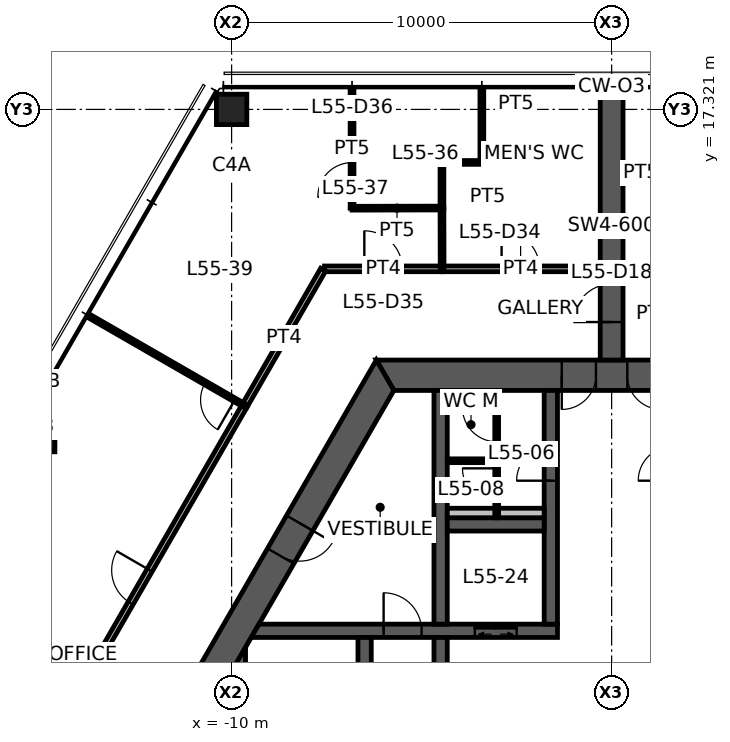
"""IFC4 building model, lengths in metres.
Left out: names, types, materials, properties, quantities, classifications, styles, units other than length and angle.
Written with IfcOpenShell. Run it as: python <this file> out.ifc"""

import sys

from ifc_helpers import new_model, si_unit, direction, frame, frame_2d, origin, origin_2d, place, context, subcontext, project, spatial, polyline, rectangle, hollow_rectangle, outline, extrude, element, fill, save


model = new_model("IFC4")
c1 = context("Model", 3, precision=1e-05, world=origin(), true_north=direction((0.0, 1.0)))
c2 = subcontext(c1, "Body", "Model", "MODEL_VIEW")
j1 = project(units=[si_unit("LENGTHUNIT", "METRE"), si_unit("PLANEANGLEUNIT", "RADIAN")], contexts=[c1])
p1 = place(None, origin())
s1 = spatial("IfcSite", under=j1, at=p1, CompositionType="ELEMENT")
p2 = place(p1, origin())
s2 = spatial("IfcBuilding", under=s1, at=p2, CompositionType="ELEMENT")
p3 = place(p2, frame((0.0, 0.0, 220.6)))
s3 = spatial("IfcBuildingStorey", under=s2, at=p3, CompositionType="ELEMENT", Elevation=220.6)
p4 = place(p3, frame((-10.0, 17.321, 0.0), z_axis=(0.0, 0.0, 1.0), x_axis=(1.0, 0.0, 0.0)))
e1 = element("IfcColumn", 1, at=p4, inside=s3, PredefinedType="COLUMN", context=c2, shape_type="SweptSolid", body=[
    extrude(hollow_rectangle(XDim=0.8, YDim=0.8, WallThickness=0.04, at=origin_2d()), origin(), (0.0, 0.0, 1.0), 3.9),
])
p5 = place(p3, frame((-15.0, 8.66, 0.0), z_axis=(0.0, 0.0, 1.0), x_axis=(1.0, 0.0, 0.0)))
e2 = element("IfcColumn", 2, at=p5, inside=s3, PredefinedType="COLUMN", context=c2, shape_type="SweptSolid", body=[
    extrude(hollow_rectangle(XDim=0.7, YDim=0.7, WallThickness=0.032, at=origin_2d()), origin(), (0.0, 0.0, 1.0), 3.9),
])
p6 = place(p3, frame((5.961, 10.325, 0.0), z_axis=(0.0, 0.0, 1.0), x_axis=(-1.0, 0.0, 0.0)))
e3 = element("IfcWall", 3, at=p6, inside=s3, PredefinedType="SHEAR", context=c2, shape_type="SweptSolid", body=[
    extrude(outline(polyline([(-0.231, -0.4), (4.649, -0.4), (5.549, -0.4), (6.374, -0.4), (7.273, -0.4), (12.153, -0.4), (11.691, 0.4), (7.273, 0.4), (6.374, 0.4), (5.549, 0.4), (4.649, 0.4), (0.231, 0.4), (-0.231, -0.4)])), origin(), (0.0, 0.0, 1.0), 3.9),
])
p7 = place(p6, frame((6.374, 0.0, 0.0)))
e4 = element("IfcOpeningElement", 4, at=p7, cuts=e3, PredefinedType="OPENING", context=c2, shape_type="SweptSolid", body=[
    extrude(rectangle(XDim=0.9, YDim=2.1, at=frame_2d((0.45, 1.05))), frame((0.0, 0.41, 0.0), z_axis=(0.0, -1.0, 0.0), x_axis=(1.0, 0.0, 0.0)), (0.0, 0.0, 1.0), 0.82),
])
p8 = place(p6, frame((4.649, 0.0, 0.0)))
e5 = element("IfcOpeningElement", 5, at=p8, cuts=e3, PredefinedType="OPENING", context=c2, shape_type="SweptSolid", body=[
    extrude(rectangle(XDim=0.9, YDim=2.1, at=frame_2d((0.45, 1.05))), frame((0.0, 0.41, 0.0), z_axis=(0.0, -1.0, 0.0), x_axis=(1.0, 0.0, 0.0)), (0.0, 0.0, 1.0), 0.82),
])
p9 = place(p3, frame((-5.961, 10.325, 0.0), z_axis=(0.0, 0.0, 1.0), x_axis=(-0.500004296715, -0.866022923061, 0.0)))
e6 = element("IfcWall", 6, at=p9, inside=s3, PredefinedType="SHEAR", context=c2, shape_type="SweptSolid", body=[
    extrude(outline(polyline([(-0.231, -0.4), (4.494, -0.4), (5.494, -0.4), (12.153, -0.4), (11.691, 0.4), (5.494, 0.4), (4.494, 0.4), (0.231, 0.4), (-0.231, -0.4)])), origin(), (0.0, 0.0, 1.0), 3.9),
])
p10 = place(p9, frame((4.494, 0.0, 0.0)))
e7 = element("IfcOpeningElement", 7, at=p10, cuts=e6, PredefinedType="OPENING", context=c2, shape_type="SweptSolid", body=[
    extrude(rectangle(XDim=1.0, YDim=2.1, at=frame_2d((0.5, 1.05))), frame((0.0, 0.41, 0.0), z_axis=(0.0, -1.0, 0.0), x_axis=(1.0, 0.0, 0.0)), (0.0, 0.0, 1.0), 0.82),
])
p11 = place(p3, frame((0.0, 10.725, 0.0), z_axis=(0.0, 0.0, 1.0), x_axis=(0.0, 1.0, 0.0)))
e8 = element("IfcWall", 8, at=p11, inside=s3, PredefinedType="SHEAR", context=c2, shape_type="SweptSolid", body=[
    extrude(rectangle(XDim=7.045, YDim=0.6, at=frame_2d((3.523, 0.0))), origin(), (0.0, 0.0, 1.0), 3.9),
])
p12 = place(p11, frame((1.0, 0.0, 0.0)))
e9 = element("IfcOpeningElement", 9, at=p12, cuts=e8, PredefinedType="OPENING", context=c2, shape_type="SweptSolid", body=[
    extrude(rectangle(XDim=1.0, YDim=2.1, at=frame_2d((0.5, 1.05))), frame((0.0, 0.31, 0.0), z_axis=(0.0, -1.0, 0.0), x_axis=(1.0, 0.0, 0.0)), (0.0, 0.0, 1.0), 0.62),
])
p13 = place(p3, frame((-9.382, 3.6, 0.0), z_axis=(0.0, 0.0, 1.0), x_axis=(1.0, 0.0, 0.0)))
e10 = element("IfcWall", 10, at=p13, inside=s3, PredefinedType="SHEAR", context=c2, shape_type="SweptSolid", body=[
    extrude(outline(polyline([(-0.101, -0.175), (3.382, -0.175), (4.382, -0.175), (5.782, -0.175), (6.882, -0.175), (7.957, -0.175), (7.957, 0.175), (6.882, 0.175), (5.782, 0.175), (4.382, 0.175), (3.382, 0.175), (0.101, 0.175), (-0.101, -0.175)])), origin(), (0.0, 0.0, 1.0), 3.9),
])
p14 = place(p13, frame((3.382, 0.0, 0.0)))
e11 = element("IfcOpeningElement", 11, at=p14, cuts=e10, PredefinedType="OPENING", context=c2, shape_type="SweptSolid", body=[
    extrude(rectangle(XDim=1.0, YDim=2.1, at=frame_2d((0.5, 1.05))), frame((0.0, 0.185, 0.0), z_axis=(0.0, -1.0, 0.0), x_axis=(1.0, 0.0, 0.0)), (0.0, 0.0, 1.0), 0.37),
])
p15 = place(p13, frame((5.782, 0.0, 0.0)))
e12 = element("IfcOpeningElement", 12, at=p15, cuts=e10, PredefinedType="OPENING", context=c2, shape_type="SweptSolid", body=[
    extrude(rectangle(XDim=1.1, YDim=2.1, at=frame_2d((0.55, 1.05))), frame((0.0, 0.185, 0.0), z_axis=(0.0, -1.0, 0.0), x_axis=(1.0, 0.0, 0.0)), (0.0, 0.0, 1.0), 0.37),
])
p16 = place(p3, frame((-1.6, 3.775, 0.0), z_axis=(0.0, 0.0, 1.0), x_axis=(0.0, 1.0, 0.0)))
e13 = element("IfcWall", 13, at=p16, inside=s3, PredefinedType="SHEAR", context=c2, shape_type="SweptSolid", body=[
    extrude(rectangle(XDim=6.15, YDim=0.35, at=frame_2d((3.075, 0.0))), origin(), (0.0, 0.0, 1.0), 3.9),
])
p17 = place(p16, frame((3.775, 0.0, 0.0)))
e14 = element("IfcOpeningElement", 14, at=p17, cuts=e13, PredefinedType="OPENING", context=c2, shape_type="SweptSolid", body=[
    extrude(rectangle(XDim=0.9, YDim=2.1, at=frame_2d((0.45, 1.05))), frame((0.0, 0.185, 0.0), z_axis=(0.0, -1.0, 0.0), x_axis=(1.0, 0.0, 0.0)), (0.0, 0.0, 1.0), 0.37),
])
p18 = place(p3, frame((-4.5, -3.425, 0.0), z_axis=(0.0, 0.0, 1.0), x_axis=(0.0, 1.0, 0.0)))
e15 = element("IfcWall", 15, at=p18, inside=s3, PredefinedType="SHEAR", context=c2, shape_type="SweptSolid", body=[
    extrude(rectangle(XDim=6.85, YDim=0.35, at=frame_2d((3.425, 0.0))), origin(), (0.0, 0.0, 1.0), 3.9),
])
p19 = place(p18, frame((2.925, 0.0, 0.0)))
e16 = element("IfcOpeningElement", 16, at=p19, cuts=e15, PredefinedType="OPENING", context=c2, shape_type="SweptSolid", body=[
    extrude(rectangle(XDim=1.0, YDim=2.1, at=frame_2d((0.5, 1.05))), frame((0.0, 0.185, 0.0), z_axis=(0.0, -1.0, 0.0), x_axis=(1.0, 0.0, 0.0)), (0.0, 0.0, 1.0), 0.37),
])
p20 = place(p3, frame((-6.5, -3.425, 0.0), z_axis=(0.0, 0.0, 1.0), x_axis=(0.0, 1.0, 0.0)))
e17 = element("IfcWall", 17, at=p20, inside=s3, PredefinedType="SHEAR", context=c2, shape_type="SweptSolid", body=[
    extrude(rectangle(XDim=6.85, YDim=0.35, at=frame_2d((3.425, 0.0))), origin(), (0.0, 0.0, 1.0), 3.9),
])
p21 = place(p20, frame((0.1, 0.0, 0.0)))
e18 = element("IfcOpeningElement", 18, at=p21, cuts=e17, PredefinedType="OPENING", context=c2, shape_type="SweptSolid", body=[
    extrude(rectangle(XDim=1.0, YDim=2.1, at=frame_2d((0.5, 1.05))), frame((0.0, 0.185, 0.0), z_axis=(0.0, -1.0, 0.0), x_axis=(1.0, 0.0, 0.0)), (0.0, 0.0, 1.0), 0.37),
])
p22 = place(p3, frame((-4.5, 3.775, 0.0), z_axis=(0.0, 0.0, 1.0), x_axis=(0.0, 1.0, 0.0)))
e19 = element("IfcWall", 19, at=p22, inside=s3, PredefinedType="SHEAR", context=c2, shape_type="SweptSolid", body=[
    extrude(rectangle(XDim=6.15, YDim=0.35, at=frame_2d((3.075, 0.0))), origin(), (0.0, 0.0, 1.0), 3.9),
])
p23 = place(p3, frame((-4.325, 6.4, 0.0), z_axis=(0.0, 0.0, 1.0), x_axis=(1.0, 0.0, 0.0)))
e20 = element("IfcWall", 20, at=p23, inside=s3, PredefinedType="SHEAR", context=c2, shape_type="SweptSolid", body=[
    extrude(rectangle(XDim=2.55, YDim=0.35, at=frame_2d((1.275, 0.0))), origin(), (0.0, 0.0, 1.0), 3.9),
])
p24 = place(p3, frame((-9.808, -2.862, 0.0), z_axis=(0.0, 0.0, 1.0), x_axis=(0.0, 1.0, 0.0)))
e21 = element("IfcWall", 21, at=p24, inside=s3, PredefinedType="SHEAR", context=c2, shape_type="SweptSolid", body=[
    extrude(outline(polyline([(-0.303, -0.175), (6.028, -0.175), (5.421, 0.175), (0.303, 0.175), (-0.303, -0.175)])), origin(), (0.0, 0.0, 1.0), 3.9),
])
p25 = place(p3, frame((-4.325, 6.7, 0.0), z_axis=(0.0, 0.0, 1.0), x_axis=(1.0, 0.0, 0.0)))
e22 = element("IfcWall", 22, at=p25, inside=s3, PredefinedType="PLUMBINGWALL", context=c2, shape_type="SweptSolid", body=[
    extrude(rectangle(XDim=2.55, YDim=0.25, at=frame_2d((1.275, 0.0))), origin(), (0.0, 0.0, 1.0), 3.9),
])
p26 = place(p3, frame((-3.025, 6.575, 0.0), z_axis=(0.0, 0.0, 1.0), x_axis=(0.0, 1.0, 0.0)))
e23 = element("IfcWall", 23, at=p26, inside=s3, PredefinedType="PARTITIONING", context=c2, shape_type="SweptSolid", body=[
    extrude(rectangle(XDim=3.35, YDim=0.1, at=frame_2d((1.675, 0.0))), origin(), (0.0, 0.0, 1.0), 2.95),
])
p27 = place(p26, frame((2.0, 0.0, 0.0)))
e24 = element("IfcOpeningElement", 24, at=p27, cuts=e23, PredefinedType="OPENING", context=c2, shape_type="SweptSolid", body=[
    extrude(rectangle(XDim=0.9, YDim=2.1, at=frame_2d((0.45, 1.05))), frame((0.0, 0.06, 0.0), z_axis=(0.0, -1.0, 0.0), x_axis=(1.0, 0.0, 0.0)), (0.0, 0.0, 1.0), 0.12),
])
p28 = place(p26, frame((0.4, 0.0, 0.0)))
e25 = element("IfcOpeningElement", 25, at=p28, cuts=e23, PredefinedType="OPENING", context=c2, shape_type="SweptSolid", body=[
    extrude(rectangle(XDim=0.9, YDim=2.1, at=frame_2d((0.45, 1.05))), frame((0.0, 0.06, 0.0), z_axis=(0.0, -1.0, 0.0), x_axis=(1.0, 0.0, 0.0)), (0.0, 0.0, 1.0), 0.12),
])
p29 = place(p3, frame((-3.075, 8.075, 0.0), z_axis=(0.0, 0.0, 1.0), x_axis=(-1.0, 0.0, 0.0)))
e26 = element("IfcWall", 26, at=p29, inside=s3, PredefinedType="PARTITIONING", context=c2, shape_type="SweptSolid", body=[
    extrude(rectangle(XDim=1.25, YDim=0.1, at=frame_2d((0.625, 0.0))), origin(), (0.0, 0.0, 1.0), 2.95),
])
p30 = place(p3, frame((0.32, 13.125, 0.0), z_axis=(0.0, 0.0, 1.0), x_axis=(1.0, 0.0, 0.0)))
e27 = element("IfcWall", 27, at=p30, inside=s3, PredefinedType="PARTITIONING", context=c2, shape_type="SweptSolid", body=[
    extrude(rectangle(XDim=1.585, YDim=0.15, at=frame_2d((0.792, 0.0))), origin(), (0.0, 0.0, 1.0), 2.95),
])
p31 = place(p3, frame((-4.47, 13.125, 0.0), z_axis=(0.0, 0.0, 1.0), x_axis=(1.0, 0.0, 0.0)))
e28 = element("IfcWall", 28, at=p31, inside=s3, PredefinedType="PARTITIONING", context=c2, shape_type="SweptSolid", body=[
    extrude(rectangle(XDim=4.15, YDim=0.15, at=frame_2d((2.075, 0.0))), origin(), (0.0, 0.0, 1.0), 2.95),
])
p32 = place(p31, frame((1.575, 0.0, 0.0)))
e29 = element("IfcOpeningElement", 29, at=p32, cuts=e28, PredefinedType="OPENING", context=c2, shape_type="SweptSolid", body=[
    extrude(rectangle(XDim=1.0, YDim=2.1, at=frame_2d((0.5, 1.05))), frame((0.0, 0.085, 0.0), z_axis=(0.0, -1.0, 0.0), x_axis=(1.0, 0.0, 0.0)), (0.0, 0.0, 1.0), 0.17),
])
p33 = place(p3, frame((-7.555, 13.125, 0.0), z_axis=(0.0, 0.0, 1.0), x_axis=(1.0, 0.0, 0.0)))
e30 = element("IfcWall", 30, at=p33, inside=s3, PredefinedType="PARTITIONING", context=c2, shape_type="SweptSolid", body=[
    extrude(rectangle(XDim=3.094, YDim=0.15, at=frame_2d((1.547, 0.0))), origin(), (0.0, 0.0, 1.0), 2.95),
])
p34 = place(p33, frame((1.047, 0.0, 0.0)))
e31 = element("IfcOpeningElement", 31, at=p34, cuts=e30, PredefinedType="OPENING", context=c2, shape_type="SweptSolid", body=[
    extrude(rectangle(XDim=1.0, YDim=2.1, at=frame_2d((0.5, 1.05))), frame((0.0, 0.085, 0.0), z_axis=(0.0, -1.0, 0.0), x_axis=(1.0, 0.0, 0.0)), (0.0, 0.0, 1.0), 0.17),
])
p35 = place(p3, frame((-4.465, 14.716, 0.0), z_axis=(0.0, 0.0, 1.0), x_axis=(0.0, 1.0, 0.0)))
e32 = element("IfcWall", 32, at=p35, inside=s3, PredefinedType="PARTITIONING", context=c2, shape_type="SweptSolid", body=[
    extrude(rectangle(XDim=1.209, YDim=0.1, at=frame_2d((0.605, 0.0))), origin(), (0.0, 0.0, 1.0), 2.95),
])
p36 = place(p3, frame((-4.465, 15.925, 0.0), z_axis=(0.0, 0.0, 1.0), x_axis=(1.0, 0.0, 0.0)))
e33 = element("IfcWall", 33, at=p36, inside=s3, PredefinedType="PARTITIONING", context=c2, shape_type="SweptSolid", body=[
    extrude(rectangle(XDim=1.05, YDim=0.1, at=frame_2d((0.525, 0.0))), origin(), (0.0, 0.0, 1.0), 2.95),
])
p37 = place(p3, frame((-3.415, 15.925, 0.0), z_axis=(0.0, 0.0, 1.0), x_axis=(-0.000130174433, 0.999999991527, 0.0)))
e34 = element("IfcWall", 34, at=p37, inside=s3, PredefinedType="PARTITIONING", context=c2, shape_type="SweptSolid", body=[
    extrude(rectangle(XDim=1.875, YDim=0.1, at=frame_2d((0.938, 0.0))), origin(), (0.0, 0.0, 1.0), 2.95),
])
p38 = place(p3, frame((-4.46, 13.125, 0.0), z_axis=(0.0, 0.0, 1.0), x_axis=(-0.0028989808, 0.999995797946, 0.0)))
e35 = element("IfcWall", 35, at=p38, inside=s3, PredefinedType="PARTITIONING", context=c2, shape_type="SweptSolid", body=[
    extrude(rectangle(XDim=1.6, YDim=0.1, at=frame_2d((0.8, 0.0))), origin(), (0.0, 0.0, 1.0), 2.95),
])
p39 = place(p3, frame((-6.831, 14.72, 0.0), z_axis=(0.0, 0.0, 1.0), x_axis=(0.0, 1.0, 0.0)))
e36 = element("IfcWall", 36, at=p39, inside=s3, PredefinedType="PARTITIONING", context=c2, shape_type="SweptSolid", body=[
    extrude(rectangle(XDim=3.135, YDim=0.1, at=frame_2d((1.567, 0.0))), origin(), (0.0, 0.0, 1.0), 2.95),
])
p40 = place(p39, frame((0.3, 0.0, 0.0)))
e37 = element("IfcOpeningElement", 37, at=p40, cuts=e36, PredefinedType="OPENING", context=c2, shape_type="SweptSolid", body=[
    extrude(rectangle(XDim=0.9, YDim=2.1, at=frame_2d((0.45, 1.05))), frame((0.0, 0.06, 0.0), z_axis=(0.0, -1.0, 0.0), x_axis=(1.0, 0.0, 0.0)), (0.0, 0.0, 1.0), 0.12),
])
p41 = place(p3, frame((-4.465, 14.725, 0.0), z_axis=(0.0, 0.0, 1.0), x_axis=(-0.999998077668, -0.001960780544, 0.0)))
e38 = element("IfcWall", 38, at=p41, inside=s3, PredefinedType="PARTITIONING", context=c2, shape_type="SweptSolid", body=[
    extrude(rectangle(XDim=2.366, YDim=0.1, at=frame_2d((1.183, 0.0))), origin(), (0.0, 0.0, 1.0), 2.95),
])
p42 = place(p3, frame((-9.661, 9.516, 0.0), z_axis=(0.0, 0.0, 1.0), x_axis=(0.499997836828, 0.866026652689, 0.0)))
e39 = element("IfcWall", 39, at=p42, inside=s3, PredefinedType="PARTITIONING", context=c2, shape_type="SweptSolid", body=[
    extrude(rectangle(XDim=4.144, YDim=0.15, at=frame_2d((2.072, 0.0))), origin(), (0.0, 0.0, 1.0), 2.95),
])
p43 = place(p3, frame((-15.156, 0.0, 0.0), z_axis=(0.0, 0.0, 1.0), x_axis=(0.500006847747, 0.8660214502, 0.0)))
e40 = element("IfcWall", 40, at=p43, inside=s3, PredefinedType="PARTITIONING", context=c2, shape_type="SweptSolid", body=[
    extrude(rectangle(XDim=10.998, YDim=0.15, at=frame_2d((5.499, 0.0))), origin(), (0.0, 0.0, 1.0), 2.95),
])
p44 = place(p43, frame((4.999, 0.0, 0.0)))
e41 = element("IfcOpeningElement", 41, at=p44, cuts=e40, PredefinedType="OPENING", context=c2, shape_type="SweptSolid", body=[
    extrude(rectangle(XDim=1.0, YDim=2.1, at=frame_2d((0.5, 1.05))), frame((0.0, 0.085, 0.0), z_axis=(0.0, -1.0, 0.0), x_axis=(1.0, 0.0, 0.0)), (0.0, 0.0, 1.0), 0.17),
])
p45 = place(p3, frame((-9.656, 9.524, 0.0), z_axis=(0.0, 0.0, 1.0), x_axis=(-0.866526579402, 0.499130931911, 0.0)))
e42 = element("IfcWall", 42, at=p45, inside=s3, PredefinedType="PARTITIONING", context=c2, shape_type="SweptSolid", body=[
    extrude(rectangle(XDim=4.705, YDim=0.1, at=frame_2d((2.353, 0.0))), origin(), (0.0, 0.0, 1.0), 2.95),
])
p46 = place(p45, frame((0.3, 0.0, 0.0)))
e43 = element("IfcOpeningElement", 43, at=p46, cuts=e42, PredefinedType="OPENING", context=c2, shape_type="SweptSolid", body=[
    extrude(rectangle(XDim=0.9, YDim=2.1, at=frame_2d((0.45, 1.05))), frame((0.0, 0.06, 0.0), z_axis=(0.0, -1.0, 0.0), x_axis=(1.0, 0.0, 0.0)), (0.0, 0.0, 1.0), 0.12),
])
p47 = place(p3, frame((0.0, 17.771, 0.0), z_axis=(0.0, 0.0, 1.0), x_axis=(0.0, 1.0, 0.0)))
e44 = element("IfcWall", 44, at=p47, inside=s3, PredefinedType="PARTITIONING", context=c2, shape_type="SweptSolid", body=[
    extrude(rectangle(XDim=0.085, YDim=0.175, at=frame_2d((0.042, 0.0))), origin(), (0.0, 0.0, 1.0), 3.9),
])
p48 = place(p7, origin())
e45 = element("IfcDoor", 45, at=p48, inside=s3, OperationType="SINGLE_SWING_RIGHT", PredefinedType="DOOR", context=c2, shape_type="SweptSolid", body=[
    extrude(rectangle(XDim=0.9, YDim=2.1, at=frame_2d((0.45, 1.05))), frame((0.0, 0.025, 0.0), z_axis=(0.0, -1.0, 0.0), x_axis=(1.0, 0.0, 0.0)), (0.0, 0.0, 1.0), 0.05),
])
fill(e4, e45)
p49 = place(p8, origin())
e46 = element("IfcDoor", 46, at=p49, inside=s3, OperationType="SINGLE_SWING_LEFT", PredefinedType="DOOR", context=c2, shape_type="SweptSolid", body=[
    extrude(rectangle(XDim=0.9, YDim=2.1, at=frame_2d((0.45, 1.05))), frame((0.0, 0.025, 0.0), z_axis=(0.0, -1.0, 0.0), x_axis=(1.0, 0.0, 0.0)), (0.0, 0.0, 1.0), 0.05),
])
fill(e5, e46)
p50 = place(p10, origin())
e47 = element("IfcDoor", 47, at=p50, inside=s3, OperationType="SINGLE_SWING_LEFT", PredefinedType="DOOR", context=c2, shape_type="SweptSolid", body=[
    extrude(rectangle(XDim=1.0, YDim=2.1, at=frame_2d((0.5, 1.05))), frame((0.0, 0.025, 0.0), z_axis=(0.0, -1.0, 0.0), x_axis=(1.0, 0.0, 0.0)), (0.0, 0.0, 1.0), 0.05),
])
fill(e7, e47)
p51 = place(p14, origin())
e48 = element("IfcDoor", 48, at=p51, inside=s3, OperationType="SINGLE_SWING_LEFT", PredefinedType="DOOR", context=c2, shape_type="SweptSolid", body=[
    extrude(rectangle(XDim=1.0, YDim=2.1, at=frame_2d((0.5, 1.05))), frame((0.0, 0.025, 0.0), z_axis=(0.0, -1.0, 0.0), x_axis=(1.0, 0.0, 0.0)), (0.0, 0.0, 1.0), 0.05),
])
fill(e11, e48)
p52 = place(p17, origin())
e49 = element("IfcDoor", 49, at=p52, inside=s3, OperationType="SINGLE_SWING_LEFT", PredefinedType="DOOR", context=c2, shape_type="SweptSolid", body=[
    extrude(rectangle(XDim=0.9, YDim=2.1, at=frame_2d((0.45, 1.05))), frame((0.0, 0.025, 0.0), z_axis=(0.0, -1.0, 0.0), x_axis=(1.0, 0.0, 0.0)), (0.0, 0.0, 1.0), 0.05),
])
fill(e14, e49)
p53 = place(p12, origin())
e50 = element("IfcDoor", 50, at=p53, inside=s3, OperationType="SINGLE_SWING_LEFT", PredefinedType="DOOR", context=c2, shape_type="SweptSolid", body=[
    extrude(rectangle(XDim=1.0, YDim=2.1, at=frame_2d((0.5, 1.05))), frame((0.0, 0.025, 0.0), z_axis=(0.0, -1.0, 0.0), x_axis=(1.0, 0.0, 0.0)), (0.0, 0.0, 1.0), 0.05),
])
fill(e9, e50)
p54 = place(p27, origin())
e51 = element("IfcDoor", 51, at=p54, inside=s3, OperationType="SINGLE_SWING_RIGHT", PredefinedType="DOOR", context=c2, shape_type="SweptSolid", body=[
    extrude(rectangle(XDim=0.9, YDim=2.1, at=frame_2d((0.45, 1.05))), frame((0.0, 0.025, 0.0), z_axis=(0.0, -1.0, 0.0), x_axis=(1.0, 0.0, 0.0)), (0.0, 0.0, 1.0), 0.05),
])
fill(e24, e51)
p55 = place(p28, origin())
e52 = element("IfcDoor", 52, at=p55, inside=s3, OperationType="SINGLE_SWING_RIGHT", PredefinedType="DOOR", context=c2, shape_type="SweptSolid", body=[
    extrude(rectangle(XDim=0.9, YDim=2.1, at=frame_2d((0.45, 1.05))), frame((0.0, 0.025, 0.0), z_axis=(0.0, -1.0, 0.0), x_axis=(1.0, 0.0, 0.0)), (0.0, 0.0, 1.0), 0.05),
])
fill(e25, e52)
p56 = place(p32, origin())
e53 = element("IfcDoor", 53, at=p56, inside=s3, OperationType="SINGLE_SWING_LEFT", PredefinedType="DOOR", context=c2, shape_type="SweptSolid", body=[
    extrude(rectangle(XDim=1.0, YDim=2.1, at=frame_2d((0.5, 1.05))), frame((0.0, 0.025, 0.0), z_axis=(0.0, -1.0, 0.0), x_axis=(1.0, 0.0, 0.0)), (0.0, 0.0, 1.0), 0.05),
])
fill(e29, e53)
p57 = place(p34, origin())
e54 = element("IfcDoor", 54, at=p57, inside=s3, OperationType="SINGLE_SWING_LEFT", PredefinedType="DOOR", context=c2, shape_type="SweptSolid", body=[
    extrude(rectangle(XDim=1.0, YDim=2.1, at=frame_2d((0.5, 1.05))), frame((0.0, 0.025, 0.0), z_axis=(0.0, -1.0, 0.0), x_axis=(1.0, 0.0, 0.0)), (0.0, 0.0, 1.0), 0.05),
])
fill(e31, e54)
p58 = place(p40, origin())
e55 = element("IfcDoor", 55, at=p58, inside=s3, OperationType="SINGLE_SWING_LEFT", PredefinedType="DOOR", context=c2, shape_type="SweptSolid", body=[
    extrude(rectangle(XDim=0.9, YDim=2.1, at=frame_2d((0.45, 1.05))), frame((0.0, 0.025, 0.0), z_axis=(0.0, -1.0, 0.0), x_axis=(1.0, 0.0, 0.0)), (0.0, 0.0, 1.0), 0.05),
])
fill(e37, e55)
p59 = place(p44, origin())
e56 = element("IfcDoor", 56, at=p59, inside=s3, OperationType="SINGLE_SWING_RIGHT", PredefinedType="DOOR", context=c2, shape_type="SweptSolid", body=[
    extrude(rectangle(XDim=1.0, YDim=2.1, at=frame_2d((0.5, 1.05))), frame((0.0, 0.025, 0.0), z_axis=(0.0, -1.0, 0.0), x_axis=(1.0, 0.0, 0.0)), (0.0, 0.0, 1.0), 0.05),
])
fill(e41, e56)
p60 = place(p46, origin())
e57 = element("IfcDoor", 57, at=p60, inside=s3, OperationType="SINGLE_SWING_LEFT", PredefinedType="DOOR", context=c2, shape_type="SweptSolid", body=[
    extrude(rectangle(XDim=0.9, YDim=2.1, at=frame_2d((0.45, 1.05))), frame((0.0, 0.025, 0.0), z_axis=(0.0, -1.0, 0.0), x_axis=(1.0, 0.0, 0.0)), (0.0, 0.0, 1.0), 0.05),
])
fill(e43, e57)
p61 = place(p15, origin())
e58 = element("IfcDoor", 58, at=p61, inside=s3, OperationType="DOUBLE_DOOR_SLIDING", PredefinedType="DOOR", context=c2, shape_type="SweptSolid", body=[
    extrude(rectangle(XDim=1.1, YDim=2.1, at=frame_2d((0.55, 1.05))), frame((0.0, 0.025, 0.0), z_axis=(0.0, -1.0, 0.0), x_axis=(1.0, 0.0, 0.0)), (0.0, 0.0, 1.0), 0.05),
])
fill(e12, e58)
save(model, sys.argv[1])
